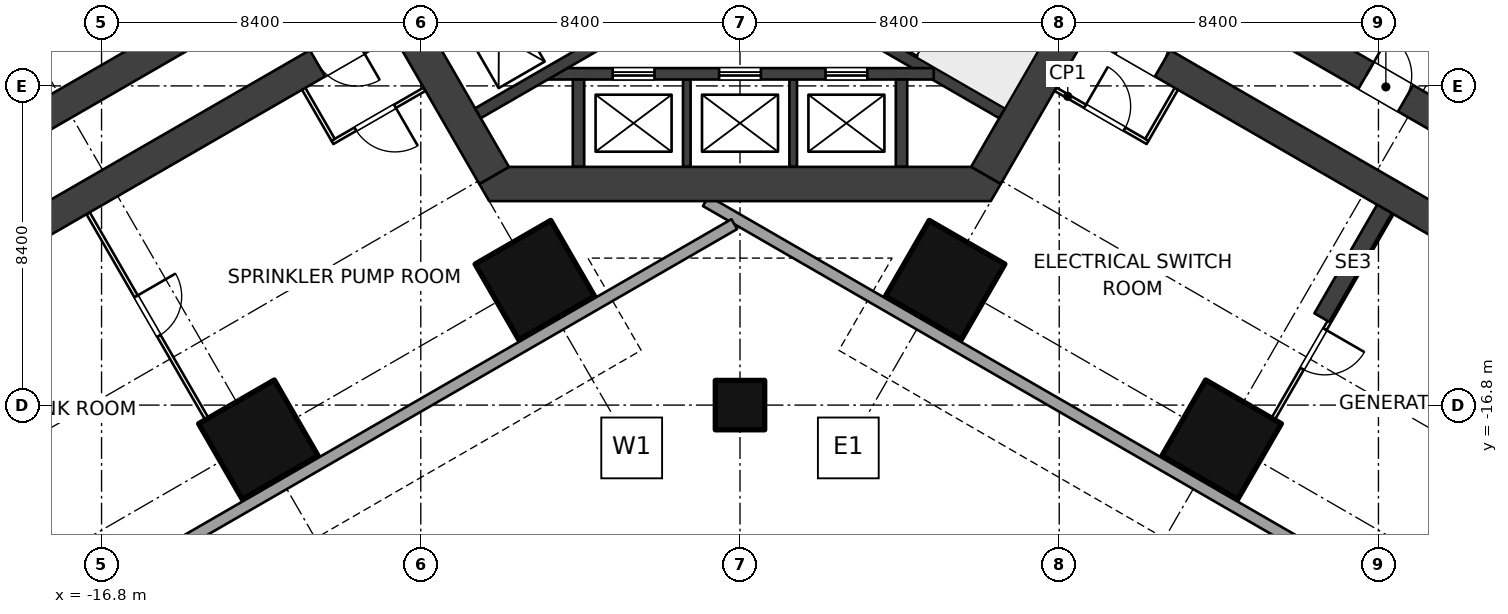
"""IFC4 building model, lengths in metres.
Left out: names, types, materials, properties, quantities, classifications, styles, units other than length and angle.
Written with IfcOpenShell. Run it as: python <this file> out.ifc"""

import sys

from ifc_helpers import new_model, si_unit, direction, frame, frame_2d, origin, origin_2d, place, context, subcontext, project, spatial, polyline, rectangle, outline, extrude, element, fill, save


model = new_model("IFC4")
c1 = context("Model", 3, precision=1e-05, world=origin(), true_north=direction((0.0, 1.0)))
c2 = subcontext(c1, "Body", "Model", "MODEL_VIEW")
j1 = project(units=[si_unit("LENGTHUNIT", "METRE"), si_unit("PLANEANGLEUNIT", "RADIAN")], contexts=[c1])
p1 = place(None, origin())
s1 = spatial("IfcSite", under=j1, at=p1, CompositionType="ELEMENT")
p2 = place(p1, origin())
s2 = spatial("IfcBuilding", under=s1, at=p2, CompositionType="ELEMENT")
p3 = place(p2, frame((0.0, 0.0, -10.5)))
s3 = spatial("IfcBuildingStorey", under=s2, at=p3, CompositionType="ELEMENT", Elevation=-10.5)
for number, where, z_axis, x_axis in (
    (1, (-5.4, -13.51, 0.0), (0.0, 0.0, 1.0), (-0.5, 0.866, 0.0)),
    (2, (-12.675, -17.71, 0.0), (0.0, 0.0, 1.0), (-0.5, 0.866, 0.0)),
    (3, (5.4, -13.51, 0.0), (0.0, 0.0, 1.0), (-0.5, -0.866, 0.0)),
    (4, (12.675, -17.71, 0.0), (0.0, 0.0, 1.0), (-0.5, -0.866, 0.0)),
):
    element("IfcColumn", number, at=place(p3, frame(where, z_axis=z_axis, x_axis=x_axis)), inside=s3, PredefinedType="COLUMN", context=c2, shape_type="SweptSolid", body=[
        extrude(rectangle(XDim=2.3, YDim=2.3, at=origin_2d()), origin(), (0.0, 0.0, 1.0), 3.5),
    ])
p4 = place(p3, frame((0.0, -16.8, 0.0), z_axis=(0.0, 0.0, 1.0), x_axis=(1.0, 0.0, 0.0)))
e5 = element("IfcColumn", 5, at=p4, inside=s3, PredefinedType="COLUMN", context=c2, shape_type="SweptSolid", body=[
    extrude(rectangle(XDim=1.3, YDim=1.3, at=origin_2d()), origin(), (0.0, 0.0, 1.0), 3.5),
])
p5 = place(p3, frame((-6.47, -10.757, 0.0), z_axis=(0.0, 0.0, 1.0), x_axis=(-0.499997612506, 0.8660267822, 0.0)))
e6 = element("IfcWall", 6, at=p5, inside=s3, PredefinedType="SHEAR", context=c2, shape_type="SweptSolid", body=[
    extrude(rectangle(XDim=12.161, YDim=0.9, at=frame_2d((6.08, 0.0))), origin(), (0.0, 0.0, 1.0), 3.5),
])
p6 = place(p5, frame((5.33, 0.0, 0.0)))
e7 = element("IfcOpeningElement", 7, at=p6, cuts=e6, PredefinedType="OPENING", context=c2, shape_type="SweptSolid", body=[
    extrude(rectangle(XDim=1.5, YDim=2.1, at=frame_2d((0.75, 1.05))), frame((0.0, 0.46, 0.0), z_axis=(0.0, -1.0, 0.0), x_axis=(1.0, 0.0, 0.0)), (0.0, 0.0, 1.0), 0.92),
])
p7 = place(p3, frame((12.551, -0.225, 0.0), z_axis=(0.0, 0.0, 1.0), x_axis=(-0.499997612506, -0.8660267822, 0.0)))
e8 = element("IfcWall", 8, at=p7, inside=s3, PredefinedType="SHEAR", context=c2, shape_type="SweptSolid", body=[
    extrude(rectangle(XDim=12.161, YDim=0.9, at=frame_2d((6.08, 0.0))), origin(), (0.0, 0.0, 1.0), 3.5),
])
p8 = place(p7, frame((5.33, 0.0, 0.0)))
e9 = element("IfcOpeningElement", 9, at=p8, cuts=e8, PredefinedType="OPENING", context=c2, shape_type="SweptSolid", body=[
    extrude(rectangle(XDim=1.5, YDim=2.1, at=frame_2d((0.75, 1.05))), frame((0.0, 0.46, 0.0), z_axis=(0.0, -1.0, 0.0), x_axis=(1.0, 0.0, 0.0)), (0.0, 0.0, 1.0), 0.92),
])
p9 = place(p3, origin())
e10 = element("IfcWall", 10, at=p9, inside=s3, PredefinedType="SHEAR", context=c2, shape_type="SweptSolid", body=[
    extrude(outline(polyline([(-6.6, -11.432), (6.6, -11.432), (6.86, -10.981), (6.08, -10.531), (-6.08, -10.531), (-6.86, -10.981), (-6.6, -11.432)])), origin(), (0.0, 0.0, 1.0), 3.5),
])
for number, where, z_axis, x_axis in (
    (11, (-0.919, -5.669, 0.0), (0.0, 0.0, 1.0), (-0.866, -0.5, 0.0)),
    (12, (0.919, -5.669, 0.0), (0.0, 0.0, 1.0), (0.866, -0.5, 0.0)),
):
    element("IfcWall", number, at=place(p3, frame(where, z_axis=z_axis, x_axis=x_axis)), inside=s3, PredefinedType="SHEAR", context=c2, shape_type="SweptSolid", body=[
        extrude(rectangle(XDim=6.902, YDim=0.3, at=frame_2d((3.451, 0.0))), origin(), (0.0, 0.0, 1.0), 3.5),
    ])
p10 = place(p3, frame((5.098, -8.082, 0.0), z_axis=(0.0, 0.0, 1.0), x_axis=(-1.0, 0.0, 0.0)))
e13 = element("IfcWall", 13, at=p10, inside=s3, PredefinedType="SHEAR", context=c2, shape_type="SweptSolid", body=[
    extrude(rectangle(XDim=10.195, YDim=0.3, at=frame_2d((5.098, 0.0))), origin(), (0.0, 0.0, 1.0), 3.5),
])
p11 = place(p10, frame((1.748, 0.0, 0.0)))
e14 = element("IfcOpeningElement", 14, at=p11, cuts=e13, PredefinedType="OPENING", context=c2, shape_type="SweptSolid", body=[
    extrude(rectangle(XDim=1.1, YDim=2.1, at=frame_2d((0.55, 1.05))), frame((0.0, 0.16, 0.0), z_axis=(0.0, -1.0, 0.0), x_axis=(1.0, 0.0, 0.0)), (0.0, 0.0, 1.0), 0.32),
])
p12 = place(p10, frame((4.548, 0.0, 0.0)))
e15 = element("IfcOpeningElement", 15, at=p12, cuts=e13, PredefinedType="OPENING", context=c2, shape_type="SweptSolid", body=[
    extrude(rectangle(XDim=1.1, YDim=2.1, at=frame_2d((0.55, 1.05))), frame((0.0, 0.16, 0.0), z_axis=(0.0, -1.0, 0.0), x_axis=(1.0, 0.0, 0.0)), (0.0, 0.0, 1.0), 0.32),
])
p13 = place(p10, frame((7.348, 0.0, 0.0)))
e16 = element("IfcOpeningElement", 16, at=p13, cuts=e13, PredefinedType="OPENING", context=c2, shape_type="SweptSolid", body=[
    extrude(rectangle(XDim=1.1, YDim=2.1, at=frame_2d((0.55, 1.05))), frame((0.0, 0.16, 0.0), z_axis=(0.0, -1.0, 0.0), x_axis=(1.0, 0.0, 0.0)), (0.0, 0.0, 1.0), 0.32),
])
for number, where, z_axis, x_axis in (
    (17, (4.25, -8.231, 0.0), (0.0, 0.0, 1.0), (0.0, -1.0, 0.0)),
    (18, (-4.25, -8.231, 0.0), (0.0, 0.0, 1.0), (0.0, -1.0, 0.0)),
):
    element("IfcWall", number, at=place(p3, frame(where, z_axis=z_axis, x_axis=x_axis)), inside=s3, PredefinedType="SHEAR", context=c2, shape_type="SweptSolid", body=[
        extrude(rectangle(XDim=2.3, YDim=0.3, at=frame_2d((1.15, 0.0))), origin(), (0.0, 0.0, 1.0), 3.5),
    ])
for number, where, z_axis, x_axis in (
    (19, (1.4, -8.231, 0.0), (0.0, 0.0, 1.0), (0.0, -1.0, 0.0)),
    (20, (-1.4, -8.231, 0.0), (0.0, 0.0, 1.0), (0.0, -1.0, 0.0)),
):
    element("IfcWall", number, at=place(p3, frame(where, z_axis=z_axis, x_axis=x_axis)), inside=s3, PredefinedType="SHEAR", context=c2, shape_type="SweptSolid", body=[
        extrude(rectangle(XDim=2.3, YDim=0.2, at=frame_2d((1.15, 0.0))), origin(), (0.0, 0.0, 1.0), 3.5),
    ])
p14 = place(p3, frame((-8.91, -6.53, 0.0), z_axis=(0.0, 0.0, 1.0), x_axis=(-0.866025284237, -0.500000207062, 0.0)))
e21 = element("IfcWall", 21, at=p14, inside=s3, PredefinedType="SHEAR", context=c2, shape_type="SweptSolid", body=[
    extrude(rectangle(XDim=36.75, YDim=0.8, at=frame_2d((18.375, 0.0))), origin(), (0.0, 0.0, 1.0), 3.5),
])
p15 = place(p14, frame((1.35, 0.0, 0.0)))
e22 = element("IfcOpeningElement", 22, at=p15, cuts=e21, PredefinedType="OPENING", context=c2, shape_type="SweptSolid", body=[
    extrude(rectangle(XDim=1.2, YDim=2.1, at=frame_2d((0.6, 1.05))), frame((0.0, 0.41, 0.0), z_axis=(0.0, -1.0, 0.0), x_axis=(1.0, 0.0, 0.0)), (0.0, 0.0, 1.0), 0.82),
])
p16 = place(p3, frame((-10.11, -4.451, 0.0), z_axis=(0.0, 0.0, 1.0), x_axis=(-0.866025284237, -0.500000207062, 0.0)))
e23 = element("IfcWall", 23, at=p16, inside=s3, PredefinedType="SHEAR", context=c2, shape_type="SweptSolid", body=[
    extrude(rectangle(XDim=36.75, YDim=0.8, at=frame_2d((18.375, 0.0))), origin(), (0.0, 0.0, 1.0), 3.5),
])
p17 = place(p16, frame((1.35, 0.0, 0.0)))
e24 = element("IfcOpeningElement", 24, at=p17, cuts=e23, PredefinedType="OPENING", context=c2, shape_type="SweptSolid", body=[
    extrude(rectangle(XDim=1.2, YDim=2.1, at=frame_2d((0.6, 1.05))), frame((0.0, 0.41, 0.0), z_axis=(0.0, -1.0, 0.0), x_axis=(1.0, 0.0, 0.0)), (0.0, 0.0, 1.0), 0.82),
])
p18 = place(p3, frame((10.11, -4.451, 0.0), z_axis=(0.0, 0.0, 1.0), x_axis=(0.866025284237, -0.500000207062, 0.0)))
e25 = element("IfcWall", 25, at=p18, inside=s3, PredefinedType="SHEAR", context=c2, shape_type="SweptSolid", body=[
    extrude(rectangle(XDim=36.75, YDim=0.8, at=frame_2d((18.375, 0.0))), origin(), (0.0, 0.0, 1.0), 3.5),
])
p19 = place(p18, frame((2.75, 0.0, 0.0)))
e26 = element("IfcOpeningElement", 26, at=p19, cuts=e25, PredefinedType="OPENING", context=c2, shape_type="SweptSolid", body=[
    extrude(rectangle(XDim=1.2, YDim=2.1, at=frame_2d((0.6, 1.05))), frame((0.0, 0.41, 0.0), z_axis=(0.0, -1.0, 0.0), x_axis=(1.0, 0.0, 0.0)), (0.0, 0.0, 1.0), 0.82),
])
p20 = place(p18, frame((7.35, 0.0, 0.0)))
e27 = element("IfcOpeningElement", 27, at=p20, cuts=e25, PredefinedType="OPENING", context=c2, shape_type="SweptSolid", body=[
    extrude(rectangle(XDim=1.2, YDim=2.1, at=frame_2d((0.6, 1.05))), frame((0.0, 0.41, 0.0), z_axis=(0.0, -1.0, 0.0), x_axis=(1.0, 0.0, 0.0)), (0.0, 0.0, 1.0), 0.82),
])
p21 = place(p3, frame((8.91, -6.53, 0.0), z_axis=(0.0, 0.0, 1.0), x_axis=(0.866025284237, -0.500000207062, 0.0)))
e28 = element("IfcWall", 28, at=p21, inside=s3, PredefinedType="SHEAR", context=c2, shape_type="SweptSolid", body=[
    extrude(rectangle(XDim=36.75, YDim=0.8, at=frame_2d((18.375, 0.0))), origin(), (0.0, 0.0, 1.0), 3.5),
])
p22 = place(p21, frame((1.35, 0.0, 0.0)))
e29 = element("IfcOpeningElement", 29, at=p22, cuts=e28, PredefinedType="OPENING", context=c2, shape_type="SweptSolid", body=[
    extrude(rectangle(XDim=1.2, YDim=2.1, at=frame_2d((0.6, 1.05))), frame((0.0, 0.41, 0.0), z_axis=(0.0, -1.0, 0.0), x_axis=(1.0, 0.0, 0.0)), (0.0, 0.0, 1.0), 0.82),
])
p23 = place(p3, frame((-8.3, -8.487, 0.0), z_axis=(0.0, 0.0, 1.0), x_axis=(-0.866034573852, -0.49998411664, 0.0)))
e30 = element("IfcWall", 30, at=p23, inside=s3, PredefinedType="PARTITIONING", context=c2, shape_type="SweptSolid", body=[
    extrude(rectangle(XDim=2.8, YDim=0.1, at=frame_2d((1.4, 0.0))), origin(), (0.0, 0.0, 1.0), 3.2),
])
p24 = place(p23, frame((0.9, 0.0, 0.0)))
e31 = element("IfcOpeningElement", 31, at=p24, cuts=e30, PredefinedType="OPENING", context=c2, shape_type="SweptSolid", body=[
    extrude(rectangle(XDim=1.2, YDim=2.1, at=frame_2d((0.6, 1.05))), frame((0.0, 0.06, 0.0), z_axis=(0.0, -1.0, 0.0), x_axis=(1.0, 0.0, 0.0)), (0.0, 0.0, 1.0), 0.12),
])
p25 = place(p3, frame((-11.482, -8.476, 0.0), z_axis=(0.0, 0.0, 1.0), x_axis=(0.500017819788, -0.86601511528, 0.0)))
e32 = element("IfcWall", 32, at=p25, inside=s3, PredefinedType="PARTITIONING", context=c2, shape_type="SweptSolid", body=[
    extrude(rectangle(XDim=1.55, YDim=0.1, at=frame_2d((0.775, 0.0))), origin(), (0.0, 0.0, 1.0), 3.2),
])
p26 = place(p3, frame((-17.154, -11.751, 0.0), z_axis=(0.0, 0.0, 1.0), x_axis=(0.500007509209, -0.866021068297, 0.0)))
e33 = element("IfcWall", 33, at=p26, inside=s3, PredefinedType="PARTITIONING", context=c2, shape_type="SweptSolid", body=[
    extrude(rectangle(XDim=8.6, YDim=0.1, at=frame_2d((4.3, 0.0))), origin(), (0.0, 0.0, 1.0), 3.2),
])
p27 = place(p26, frame((2.525, 0.0, 0.0)))
e34 = element("IfcOpeningElement", 34, at=p27, cuts=e33, PredefinedType="OPENING", context=c2, shape_type="SweptSolid", body=[
    extrude(rectangle(XDim=1.2, YDim=2.1, at=frame_2d((0.6, 1.05))), frame((0.0, 0.06, 0.0), z_axis=(0.0, -1.0, 0.0), x_axis=(1.0, 0.0, 0.0)), (0.0, 0.0, 1.0), 0.12),
])
p28 = place(p3, frame((8.3, -8.487, 0.0), z_axis=(0.0, 0.0, 1.0), x_axis=(0.866034573852, -0.49998411664, 0.0)))
e35 = element("IfcWall", 35, at=p28, inside=s3, PredefinedType="PARTITIONING", context=c2, shape_type="SweptSolid", body=[
    extrude(rectangle(XDim=2.8, YDim=0.1, at=frame_2d((1.4, 0.0))), origin(), (0.0, 0.0, 1.0), 3.2),
])
p29 = place(p28, frame((0.9, 0.0, 0.0)))
e36 = element("IfcOpeningElement", 36, at=p29, cuts=e35, PredefinedType="OPENING", context=c2, shape_type="SweptSolid", body=[
    extrude(rectangle(XDim=1.2, YDim=2.1, at=frame_2d((0.6, 1.05))), frame((0.0, 0.06, 0.0), z_axis=(0.0, -1.0, 0.0), x_axis=(1.0, 0.0, 0.0)), (0.0, 0.0, 1.0), 0.12),
])
p30 = place(p3, frame((11.482, -8.476, 0.0), z_axis=(0.0, 0.0, 1.0), x_axis=(-0.500017819788, -0.86601511528, 0.0)))
e37 = element("IfcWall", 37, at=p30, inside=s3, PredefinedType="PARTITIONING", context=c2, shape_type="SweptSolid", body=[
    extrude(rectangle(XDim=1.55, YDim=0.1, at=frame_2d((0.775, 0.0))), origin(), (0.0, 0.0, 1.0), 3.2),
])
p31 = place(p3, frame((17.154, -11.751, 0.0), z_axis=(0.0, 0.0, 1.0), x_axis=(-0.500007509209, -0.866021068297, 0.0)))
e38 = element("IfcWall", 38, at=p31, inside=s3, PredefinedType="PARTITIONING", context=c2, shape_type="SweptSolid", body=[
    extrude(rectangle(XDim=8.6, YDim=0.1, at=frame_2d((4.3, 0.0))), origin(), (0.0, 0.0, 1.0), 3.2),
])
p32 = place(p31, frame((3.525, 0.0, 0.0)))
e39 = element("IfcOpeningElement", 39, at=p32, cuts=e38, PredefinedType="OPENING", context=c2, shape_type="SweptSolid", body=[
    extrude(rectangle(XDim=1.2, YDim=2.1, at=frame_2d((0.6, 1.05))), frame((0.0, 0.06, 0.0), z_axis=(0.0, -1.0, 0.0), x_axis=(1.0, 0.0, 0.0)), (0.0, 0.0, 1.0), 0.12),
])
p33 = place(p3, frame((-0.15, -12.038, 0.0), z_axis=(0.0, 0.0, 1.0), x_axis=(-0.866026292622, -0.499998460486, 0.0)))
e40 = element("IfcWall", 40, at=p33, inside=s3, PredefinedType="SOLIDWALL", context=c2, shape_type="SweptSolid", body=[
    extrude(rectangle(XDim=41.883, YDim=0.3, at=frame_2d((20.941, 0.0))), origin(), (0.0, 0.0, 1.0), 3.2),
])
p34 = place(p33, frame((25.383, 0.0, 0.0)))
e41 = element("IfcOpeningElement", 41, at=p34, cuts=e40, PredefinedType="OPENING", context=c2, shape_type="SweptSolid", body=[
    extrude(rectangle(XDim=1.8, YDim=2.4, at=frame_2d((0.9, 1.2))), frame((0.0, 0.16, 0.0), z_axis=(0.0, -1.0, 0.0), x_axis=(1.0, 0.0, 0.0)), (0.0, 0.0, 1.0), 0.32),
])
p35 = place(p3, frame((-9.45, 6.495, 0.0), z_axis=(0.0, 0.0, 1.0), x_axis=(-0.866025301493, -0.500000177174, 0.0)))
e42 = element("IfcWall", 42, at=p35, inside=s3, PredefinedType="SOLIDWALL", context=c2, shape_type="SweptSolid", body=[
    extrude(rectangle(XDim=43.095, YDim=0.3, at=frame_2d((21.548, 0.0))), origin(), (0.0, 0.0, 1.0), 3.2),
])
p36 = place(p35, frame((26.595, 0.0, 0.0)))
e43 = element("IfcOpeningElement", 43, at=p36, cuts=e42, PredefinedType="OPENING", context=c2, shape_type="SweptSolid", body=[
    extrude(rectangle(XDim=1.8, YDim=2.4, at=frame_2d((0.9, 1.2))), frame((0.0, 0.16, 0.0), z_axis=(0.0, -1.0, 0.0), x_axis=(1.0, 0.0, 0.0)), (0.0, 0.0, 1.0), 0.32),
])
p37 = place(p3, frame((9.45, 6.495, 0.0), z_axis=(0.0, 0.0, 1.0), x_axis=(0.866025301493, -0.500000177174, 0.0)))
e44 = element("IfcWall", 44, at=p37, inside=s3, PredefinedType="SOLIDWALL", context=c2, shape_type="SweptSolid", body=[
    extrude(rectangle(XDim=43.095, YDim=0.3, at=frame_2d((21.548, 0.0))), origin(), (0.0, 0.0, 1.0), 3.2),
])
p38 = place(p37, frame((26.595, 0.0, 0.0)))
e45 = element("IfcOpeningElement", 45, at=p38, cuts=e44, PredefinedType="OPENING", context=c2, shape_type="SweptSolid", body=[
    extrude(rectangle(XDim=1.8, YDim=2.4, at=frame_2d((0.9, 1.2))), frame((0.0, 0.16, 0.0), z_axis=(0.0, -1.0, 0.0), x_axis=(1.0, 0.0, 0.0)), (0.0, 0.0, 1.0), 0.32),
])
p39 = place(p3, frame((-0.9, -11.432, 0.0), z_axis=(0.0, 0.0, 1.0), x_axis=(0.866025301493, -0.500000177174, 0.0)))
e46 = element("IfcWall", 46, at=p39, inside=s3, PredefinedType="SOLIDWALL", context=c2, shape_type="SweptSolid", body=[
    extrude(rectangle(XDim=43.095, YDim=0.3, at=frame_2d((21.548, 0.0))), origin(), (0.0, 0.0, 1.0), 3.2),
])
p40 = place(p39, frame((26.595, 0.0, 0.0)))
e47 = element("IfcOpeningElement", 47, at=p40, cuts=e46, PredefinedType="OPENING", context=c2, shape_type="SweptSolid", body=[
    extrude(rectangle(XDim=1.8, YDim=2.4, at=frame_2d((0.9, 1.2))), frame((0.0, 0.16, 0.0), z_axis=(0.0, -1.0, 0.0), x_axis=(1.0, 0.0, 0.0)), (0.0, 0.0, 1.0), 0.32),
])
p41 = place(p3, frame((16.959, -11.639, 0.0), z_axis=(0.0, 0.0, 1.0), x_axis=(-0.50002983664, -0.866008176907, 0.0)))
e48 = element("IfcWall", 48, at=p41, inside=s3, PredefinedType="SOLIDWALL", context=c2, shape_type="SweptSolid", body=[
    extrude(rectangle(XDim=3.3, YDim=0.45, at=frame_2d((1.65, 0.0))), origin(), (0.0, 0.0, 1.0), 3.5),
])
p42 = place(p11, origin())
e49 = element("IfcDoor", 49, at=p42, inside=s3, OperationType="DOUBLE_DOOR_SLIDING", PredefinedType="DOOR", context=c2, shape_type="SweptSolid", body=[
    extrude(rectangle(XDim=1.1, YDim=2.1, at=frame_2d((0.55, 1.05))), frame((0.0, 0.025, 0.0), z_axis=(0.0, -1.0, 0.0), x_axis=(1.0, 0.0, 0.0)), (0.0, 0.0, 1.0), 0.05),
])
fill(e14, e49)
p43 = place(p12, origin())
e50 = element("IfcDoor", 50, at=p43, inside=s3, OperationType="DOUBLE_DOOR_SLIDING", PredefinedType="DOOR", context=c2, shape_type="SweptSolid", body=[
    extrude(rectangle(XDim=1.1, YDim=2.1, at=frame_2d((0.55, 1.05))), frame((0.0, 0.025, 0.0), z_axis=(0.0, -1.0, 0.0), x_axis=(1.0, 0.0, 0.0)), (0.0, 0.0, 1.0), 0.05),
])
fill(e15, e50)
p44 = place(p13, origin())
e51 = element("IfcDoor", 51, at=p44, inside=s3, OperationType="DOUBLE_DOOR_SLIDING", PredefinedType="DOOR", context=c2, shape_type="SweptSolid", body=[
    extrude(rectangle(XDim=1.1, YDim=2.1, at=frame_2d((0.55, 1.05))), frame((0.0, 0.025, 0.0), z_axis=(0.0, -1.0, 0.0), x_axis=(1.0, 0.0, 0.0)), (0.0, 0.0, 1.0), 0.05),
])
fill(e16, e51)
p45 = place(p15, origin())
e52 = element("IfcDoor", 52, at=p45, inside=s3, OperationType="DOUBLE_SWING_LEFT", PredefinedType="DOOR", context=c2, shape_type="SweptSolid", body=[
    extrude(rectangle(XDim=1.2, YDim=2.1, at=frame_2d((0.6, 1.05))), frame((0.0, 0.025, 0.0), z_axis=(0.0, -1.0, 0.0), x_axis=(1.0, 0.0, 0.0)), (0.0, 0.0, 1.0), 0.05),
])
fill(e22, e52)
p46 = place(p27, origin())
e53 = element("IfcDoor", 53, at=p46, inside=s3, OperationType="DOUBLE_SWING_LEFT", PredefinedType="DOOR", context=c2, shape_type="SweptSolid", body=[
    extrude(rectangle(XDim=1.2, YDim=2.1, at=frame_2d((0.6, 1.05))), frame((0.0, 0.025, 0.0), z_axis=(0.0, -1.0, 0.0), x_axis=(1.0, 0.0, 0.0)), (0.0, 0.0, 1.0), 0.05),
])
fill(e34, e53)
p47 = place(p24, origin())
e54 = element("IfcDoor", 54, at=p47, inside=s3, OperationType="DOUBLE_SWING_LEFT", PredefinedType="DOOR", context=c2, shape_type="SweptSolid", body=[
    extrude(rectangle(XDim=1.2, YDim=2.1, at=frame_2d((0.6, 1.05))), frame((0.0, 0.025, 0.0), z_axis=(0.0, -1.0, 0.0), x_axis=(1.0, 0.0, 0.0)), (0.0, 0.0, 1.0), 0.05),
])
fill(e31, e54)
p48 = place(p20, origin())
e55 = element("IfcDoor", 55, at=p48, inside=s3, OperationType="DOUBLE_SWING_LEFT", PredefinedType="DOOR", context=c2, shape_type="SweptSolid", body=[
    extrude(rectangle(XDim=1.2, YDim=2.1, at=frame_2d((0.6, 1.05))), frame((0.0, 0.025, 0.0), z_axis=(0.0, -1.0, 0.0), x_axis=(1.0, 0.0, 0.0)), (0.0, 0.0, 1.0), 0.05),
])
fill(e27, e55)
p49 = place(p22, origin())
e56 = element("IfcDoor", 56, at=p49, inside=s3, OperationType="DOUBLE_SWING_LEFT", PredefinedType="DOOR", context=c2, shape_type="SweptSolid", body=[
    extrude(rectangle(XDim=1.2, YDim=2.1, at=frame_2d((0.6, 1.05))), frame((0.0, 0.025, 0.0), z_axis=(0.0, -1.0, 0.0), x_axis=(1.0, 0.0, 0.0)), (0.0, 0.0, 1.0), 0.05),
])
fill(e29, e56)
p50 = place(p32, origin())
e57 = element("IfcDoor", 57, at=p50, inside=s3, OperationType="DOUBLE_SWING_LEFT", PredefinedType="DOOR", context=c2, shape_type="SweptSolid", body=[
    extrude(rectangle(XDim=1.2, YDim=2.1, at=frame_2d((0.6, 1.05))), frame((0.0, 0.025, 0.0), z_axis=(0.0, -1.0, 0.0), x_axis=(1.0, 0.0, 0.0)), (0.0, 0.0, 1.0), 0.05),
])
fill(e39, e57)
p51 = place(p29, origin())
e58 = element("IfcDoor", 58, at=p51, inside=s3, OperationType="DOUBLE_SWING_LEFT", PredefinedType="DOOR", context=c2, shape_type="SweptSolid", body=[
    extrude(rectangle(XDim=1.2, YDim=2.1, at=frame_2d((0.6, 1.05))), frame((0.0, 0.025, 0.0), z_axis=(0.0, -1.0, 0.0), x_axis=(1.0, 0.0, 0.0)), (0.0, 0.0, 1.0), 0.05),
])
fill(e36, e58)
save(model, sys.argv[1])
